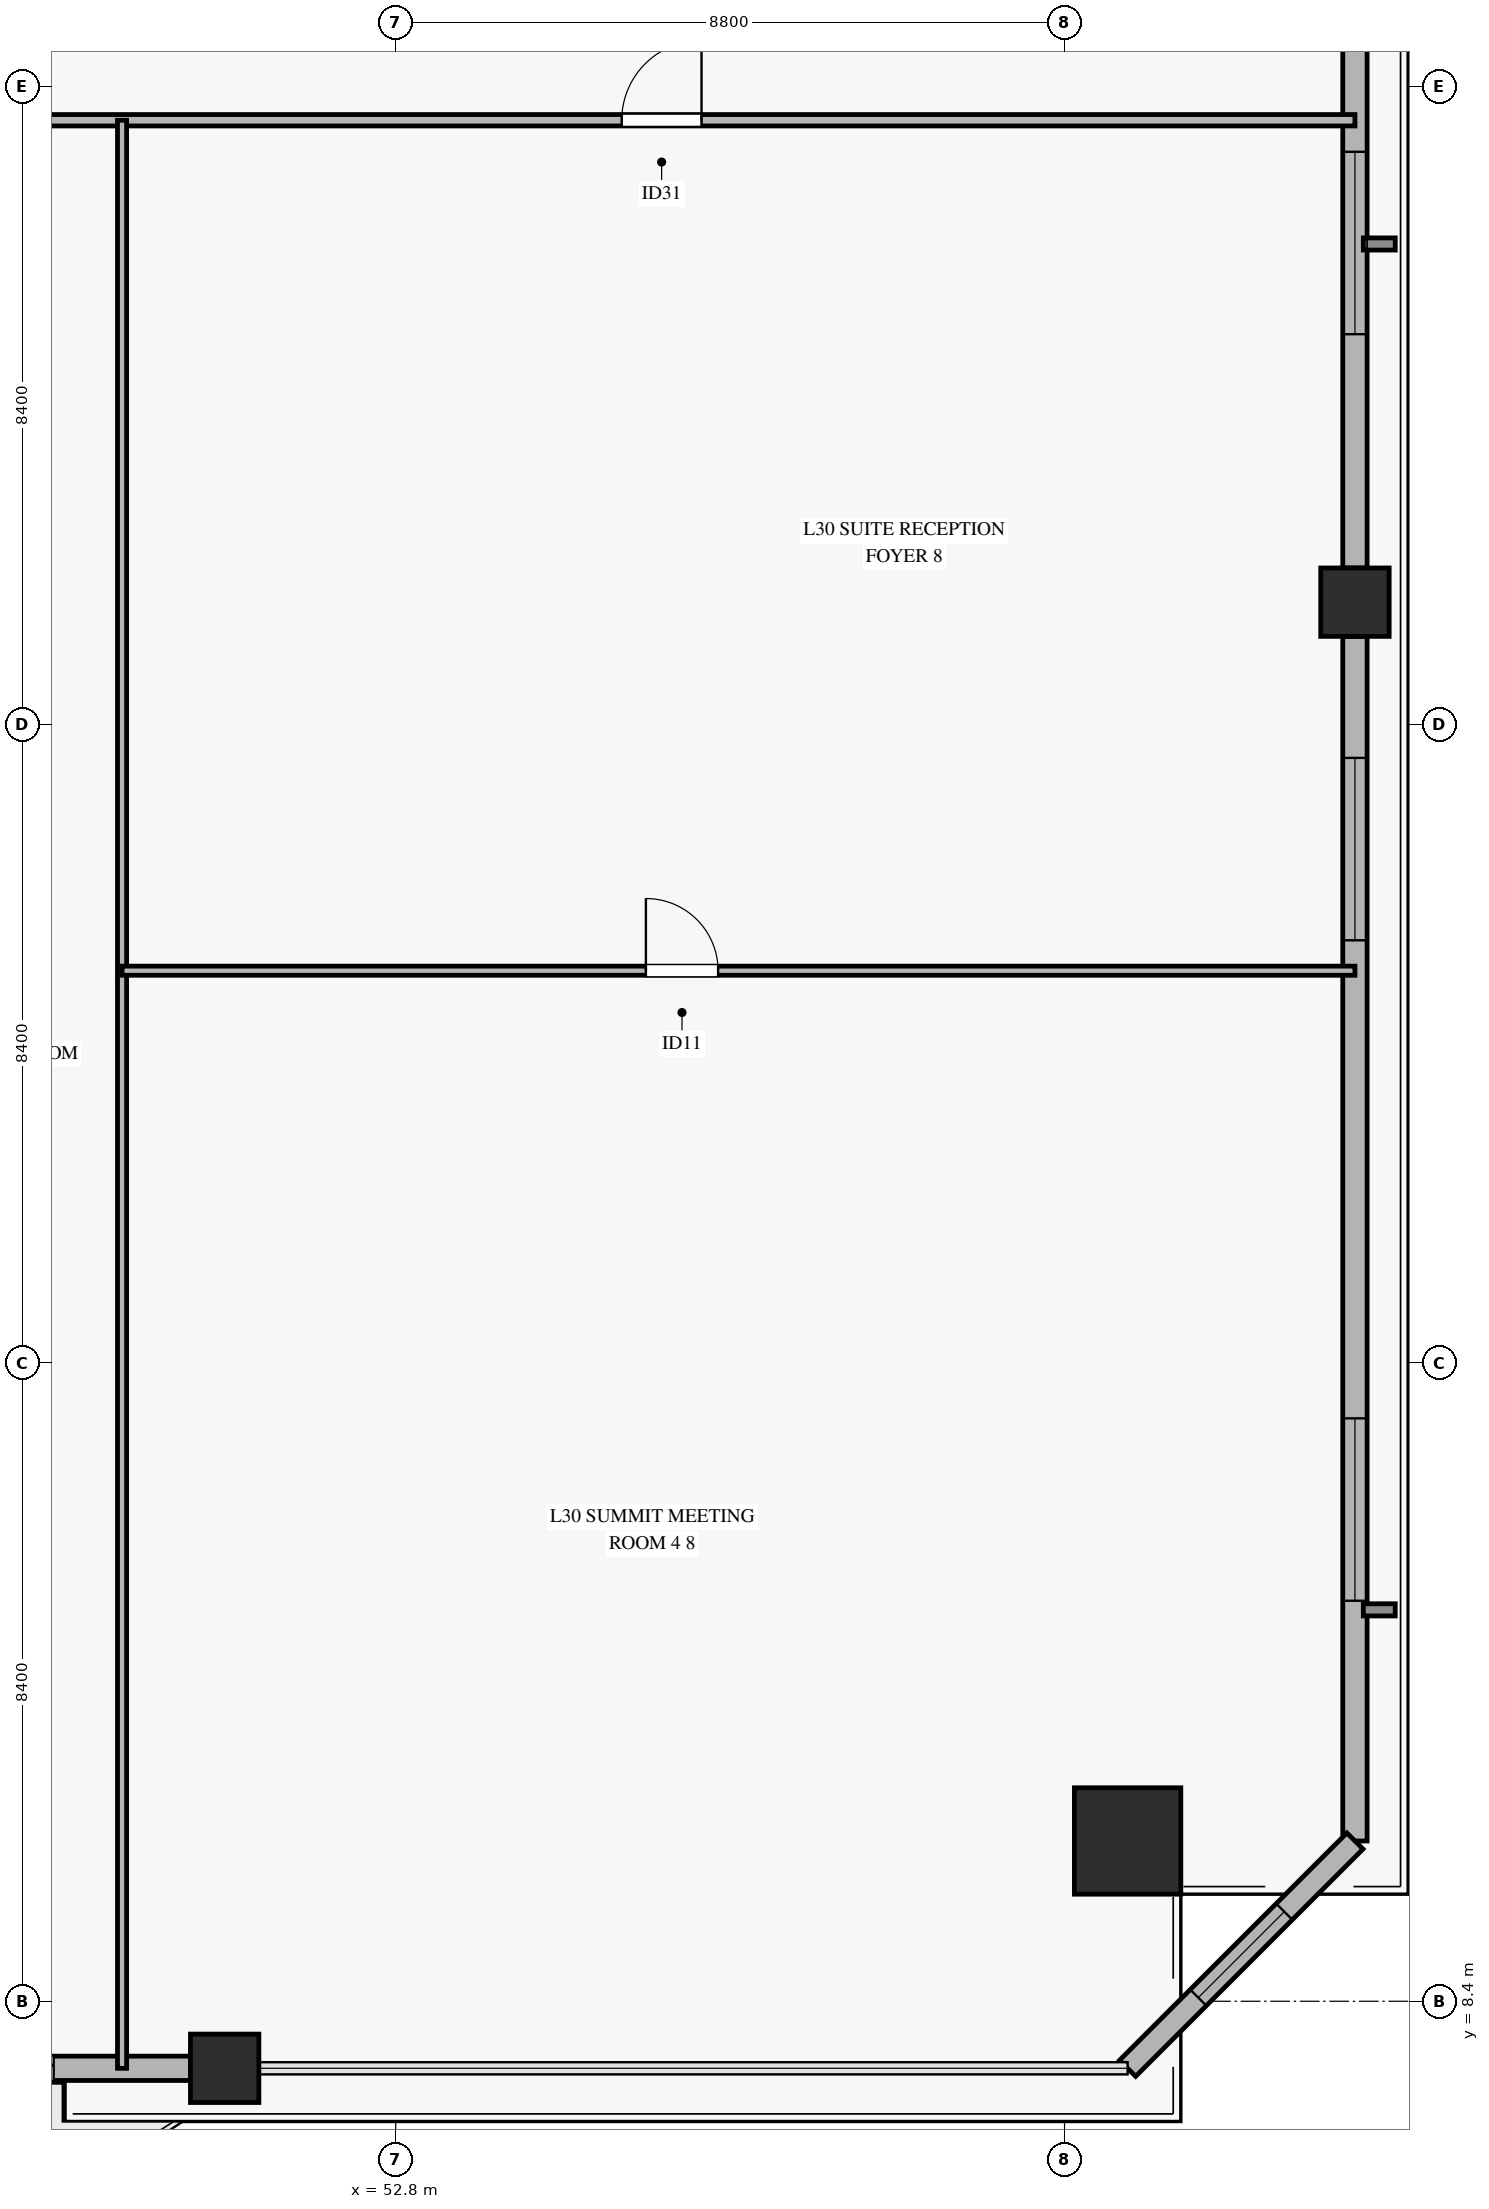
"""IFC4 building model, lengths in metres.
Left out: names, types, materials, properties, quantities, classifications, styles, units other than length and angle.
Written with IfcOpenShell. Run it as: python <this file> out.ifc"""

import sys

from ifc_helpers import new_model, si_unit, direction, frame, frame_2d, origin, origin_2d, place, context, subcontext, project, spatial, rectangle, hollow_rectangle, extrude, source, transform, mapped, element, fill, save


model = new_model("IFC4")
c1 = context("Model", 3, precision=1e-05, world=origin(), true_north=direction((0.0, 1.0)))
c2 = subcontext(c1, "Body", "Model", "MODEL_VIEW")
j1 = project(units=[si_unit("LENGTHUNIT", "METRE"), si_unit("PLANEANGLEUNIT", "RADIAN")], contexts=[c1])
p1 = place(None, origin())
s1 = spatial("IfcSite", under=j1, at=p1, CompositionType="ELEMENT")
p2 = place(p1, origin())
s2 = spatial("IfcBuilding", under=s1, at=p2, CompositionType="ELEMENT")
p3 = place(p2, frame((0.0, 0.0, 123.1)))
s3 = spatial("IfcBuildingStorey", under=s2, at=p3, CompositionType="ELEMENT", Elevation=123.1)
m1 = source(origin(), c2, "Body", "SweptSolid", [
    extrude(hollow_rectangle(XDim=1.4, YDim=1.4, WallThickness=0.065, at=origin_2d()), origin(), (0.0, 0.0, 1.0), 3.68),
])
p4 = place(p3, frame((62.43, 10.509, 0.0), z_axis=(0.0, 0.0, 1.0), x_axis=(1.0, 0.0, 0.0)))
e1 = element("IfcColumn", 1, at=p4, inside=s3, PredefinedType="COLUMN", context=c2, shape_type="MappedRepresentation", body=[
    mapped(m1, transform((0.0, 0.0, 0.0), x_axis=(1.0, 0.0, 0.0), y_axis=(0.0, 1.0, 0.0), z_axis=(0.0, 0.0, 1.0), scale=1.0)),
])
m2 = source(origin(), c2, "Body", "SweptSolid", [
    extrude(hollow_rectangle(XDim=0.9, YDim=0.9, WallThickness=0.04, at=origin_2d()), origin(), (0.0, 0.0, 1.0), 3.68),
])
for number, where, z_axis, x_axis in (
    (2, (50.55, 7.518, 0.0), (0.0, 0.0, 1.0), (1.0, 0.0, 0.0)),
    (3, (65.421, 26.809, 0.0), (0.0, 0.0, 1.0), (1.0, 0.0, 0.0)),
):
    element("IfcColumn", number, at=place(p3, frame(where, z_axis=z_axis, x_axis=x_axis)), inside=s3, PredefinedType="COLUMN", context=c2, shape_type="MappedRepresentation", body=[
        mapped(m2, transform((0.0, 0.0, 0.0), x_axis=(1.0, 0.0, 0.0), y_axis=(0.0, 1.0, 0.0), z_axis=(0.0, 0.0, 1.0), scale=1.0)),
    ])
p5 = place(p3, frame((44.75, 7.518, 0.0), z_axis=(0.0, 0.0, 1.0), x_axis=(1.0, 0.0, 0.0)))
e4 = element("IfcWall", 4, at=p5, inside=s3, PredefinedType="SOLIDWALL", context=c2, shape_type="SweptSolid", body=[
    extrude(rectangle(XDim=5.35, YDim=0.32, at=frame_2d((2.675, 0.0))), origin(), (0.0, 0.0, 1.0), 3.16),
])
p6 = place(p5, frame((1.75, 0.0, 0.0)))
e5 = element("IfcOpeningElement", 5, at=p6, cuts=e4, PredefinedType="OPENING", context=c2, shape_type="SweptSolid", body=[
    extrude(rectangle(XDim=1.8, YDim=2.25, at=frame_2d((0.9, 1.125))), frame((0.0, 0.17, 0.0), z_axis=(0.0, -1.0, 0.0), x_axis=(1.0, 0.0, 0.0)), (0.0, 0.0, 1.0), 0.34),
])
p7 = place(p3, frame((65.421, 10.509, 0.0), z_axis=(0.0, 0.0, 1.0), x_axis=(0.0, 1.0, 0.0)))
e6 = element("IfcWall", 6, at=p7, inside=s3, PredefinedType="SOLIDWALL", context=c2, shape_type="SweptSolid", body=[
    extrude(rectangle(XDim=15.85, YDim=0.32, at=frame_2d((7.925, 0.0))), origin(), (0.0, 0.0, 1.0), 3.16),
])
p8 = place(p7, frame((3.161, 0.0, 0.45)))
e7 = element("IfcOpeningElement", 7, at=p8, cuts=e6, PredefinedType="OPENING", context=c2, shape_type="SweptSolid", body=[
    extrude(rectangle(XDim=2.4, YDim=2.1, at=frame_2d((1.2, 1.05))), frame((0.0, 0.17, 0.0), z_axis=(0.0, -1.0, 0.0), x_axis=(1.0, 0.0, 0.0)), (0.0, 0.0, 1.0), 0.34),
])
p9 = place(p7, frame((11.851, 0.0, 0.45)))
e8 = element("IfcOpeningElement", 8, at=p9, cuts=e6, PredefinedType="OPENING", context=c2, shape_type="SweptSolid", body=[
    extrude(rectangle(XDim=2.4, YDim=2.1, at=frame_2d((1.2, 1.05))), frame((0.0, 0.17, 0.0), z_axis=(0.0, -1.0, 0.0), x_axis=(1.0, 0.0, 0.0)), (0.0, 0.0, 1.0), 0.34),
])
p10 = place(p3, frame((65.421, 27.259, 0.0), z_axis=(0.0, 0.0, 1.0), x_axis=(0.0, 1.0, 0.0)))
e9 = element("IfcWall", 9, at=p10, inside=s3, PredefinedType="SOLIDWALL", context=c2, shape_type="SweptSolid", body=[
    extrude(rectangle(XDim=15.85, YDim=0.32, at=frame_2d((7.925, 0.0))), origin(), (0.0, 0.0, 1.0), 3.16),
])
p11 = place(p10, frame((3.076, 0.0, 0.45)))
e10 = element("IfcOpeningElement", 10, at=p11, cuts=e9, PredefinedType="OPENING", context=c2, shape_type="SweptSolid", body=[
    extrude(rectangle(XDim=2.4, YDim=2.1, at=frame_2d((1.2, 1.05))), frame((0.0, 0.17, 0.0), z_axis=(0.0, -1.0, 0.0), x_axis=(1.0, 0.0, 0.0)), (0.0, 0.0, 1.0), 0.34),
])
p12 = place(p3, frame((62.43, 7.518, 0.0), z_axis=(0.0, 0.0, 1.0), x_axis=(0.707106781187, 0.707106781187, 0.0)))
e11 = element("IfcWall", 11, at=p12, inside=s3, PredefinedType="SOLIDWALL", context=c2, shape_type="SweptSolid", body=[
    extrude(rectangle(XDim=4.23, YDim=0.3, at=frame_2d((2.115, 0.0))), origin(), (0.0, 0.0, 1.0), 3.16),
])
p13 = place(p12, frame((1.315, 0.0, 0.45)))
e12 = element("IfcOpeningElement", 12, at=p13, cuts=e11, PredefinedType="OPENING", context=c2, shape_type="SweptSolid", body=[
    extrude(rectangle(XDim=1.6, YDim=2.0, at=frame_2d((0.8, 1.0))), frame((0.0, 0.16, 0.0), z_axis=(0.0, -1.0, 0.0), x_axis=(1.0, 0.0, 0.0)), (0.0, 0.0, 1.0), 0.32),
])
p14 = place(p3, frame((4.979, 33.15, 0.0), z_axis=(0.0, 0.0, 1.0), x_axis=(1.0, 0.0, 0.0)))
e13 = element("IfcWall", 13, at=p14, inside=s3, PredefinedType="PARTITIONING", context=c2, shape_type="SweptSolid", body=[
    extrude(rectangle(XDim=60.442, YDim=0.15, at=frame_2d((30.221, 0.0))), origin(), (0.0, 0.0, 1.0), 2.765),
])
p15 = place(p14, frame((6.774, 0.0, 0.0)))
e14 = element("IfcOpeningElement", 14, at=p15, cuts=e13, PredefinedType="OPENING", context=c2, shape_type="SweptSolid", body=[
    extrude(rectangle(XDim=1.05, YDim=2.15, at=frame_2d((0.525, 1.075))), frame((0.0, 0.085, 0.0), z_axis=(0.0, -1.0, 0.0), x_axis=(1.0, 0.0, 0.0)), (0.0, 0.0, 1.0), 0.17),
])
p16 = place(p14, frame((17.131, 0.0, 0.0)))
e15 = element("IfcOpeningElement", 15, at=p16, cuts=e13, PredefinedType="OPENING", context=c2, shape_type="SweptSolid", body=[
    extrude(rectangle(XDim=1.05, YDim=2.15, at=frame_2d((0.525, 1.075))), frame((0.0, 0.085, 0.0), z_axis=(0.0, -1.0, 0.0), x_axis=(1.0, 0.0, 0.0)), (0.0, 0.0, 1.0), 0.17),
])
p17 = place(p14, frame((21.191, 0.0, 0.0)))
e16 = element("IfcOpeningElement", 16, at=p17, cuts=e13, PredefinedType="OPENING", context=c2, shape_type="SweptSolid", body=[
    extrude(rectangle(XDim=1.05, YDim=2.15, at=frame_2d((0.525, 1.075))), frame((0.0, 0.085, 0.0), z_axis=(0.0, -1.0, 0.0), x_axis=(1.0, 0.0, 0.0)), (0.0, 0.0, 1.0), 0.17),
])
p18 = place(p14, frame((26.768, 0.0, 0.0)))
e17 = element("IfcOpeningElement", 17, at=p18, cuts=e13, PredefinedType="OPENING", context=c2, shape_type="SweptSolid", body=[
    extrude(rectangle(XDim=1.05, YDim=2.15, at=frame_2d((0.525, 1.075))), frame((0.0, 0.085, 0.0), z_axis=(0.0, -1.0, 0.0), x_axis=(1.0, 0.0, 0.0)), (0.0, 0.0, 1.0), 0.17),
])
p19 = place(p14, frame((31.968, 0.0, 0.0)))
e18 = element("IfcOpeningElement", 18, at=p19, cuts=e13, PredefinedType="OPENING", context=c2, shape_type="SweptSolid", body=[
    extrude(rectangle(XDim=1.05, YDim=2.15, at=frame_2d((0.525, 1.075))), frame((0.0, 0.085, 0.0), z_axis=(0.0, -1.0, 0.0), x_axis=(1.0, 0.0, 0.0)), (0.0, 0.0, 1.0), 0.17),
])
p20 = place(p14, frame((37.084, 0.0, 0.0)))
e19 = element("IfcOpeningElement", 19, at=p20, cuts=e13, PredefinedType="OPENING", context=c2, shape_type="SweptSolid", body=[
    extrude(rectangle(XDim=1.05, YDim=2.15, at=frame_2d((0.525, 1.075))), frame((0.0, 0.085, 0.0), z_axis=(0.0, -1.0, 0.0), x_axis=(1.0, 0.0, 0.0)), (0.0, 0.0, 1.0), 0.17),
])
p21 = place(p14, frame((41.832, 0.0, 0.0)))
e20 = element("IfcOpeningElement", 20, at=p21, cuts=e13, PredefinedType="OPENING", context=c2, shape_type="SweptSolid", body=[
    extrude(rectangle(XDim=1.05, YDim=2.15, at=frame_2d((0.525, 1.075))), frame((0.0, 0.085, 0.0), z_axis=(0.0, -1.0, 0.0), x_axis=(1.0, 0.0, 0.0)), (0.0, 0.0, 1.0), 0.17),
])
p22 = place(p14, frame((50.795, 0.0, 0.0)))
e21 = element("IfcOpeningElement", 21, at=p22, cuts=e13, PredefinedType="OPENING", context=c2, shape_type="SweptSolid", body=[
    extrude(rectangle(XDim=1.05, YDim=2.15, at=frame_2d((0.525, 1.075))), frame((0.0, 0.085, 0.0), z_axis=(0.0, -1.0, 0.0), x_axis=(1.0, 0.0, 0.0)), (0.0, 0.0, 1.0), 0.17),
])
p23 = place(p3, frame((49.2, 7.518, 0.0), z_axis=(0.0, 0.0, 1.0), x_axis=(0.0, 1.0, 0.0)))
e22 = element("IfcWall", 22, at=p23, inside=s3, PredefinedType="PARTITIONING", context=c2, shape_type="SweptSolid", body=[
    extrude(rectangle(XDim=25.632, YDim=0.12, at=frame_2d((12.816, 0.0))), origin(), (0.0, 0.0, 1.0), 3.165),
])
p24 = place(p3, frame((49.2, 21.96, 0.0), z_axis=(0.0, 0.0, 1.0), x_axis=(1.0, 0.0, 0.0)))
e23 = element("IfcWall", 23, at=p24, inside=s3, PredefinedType="PARTITIONING", context=c2, shape_type="SweptSolid", body=[
    extrude(rectangle(XDim=16.221, YDim=0.12, at=frame_2d((8.11, 0.0))), origin(), (0.0, 0.0, 1.0), 2.765),
])
p25 = place(p24, frame((6.892, 0.0, 0.0)))
e24 = element("IfcOpeningElement", 24, at=p25, cuts=e23, PredefinedType="OPENING", context=c2, shape_type="SweptSolid", body=[
    extrude(rectangle(XDim=0.95, YDim=2.1, at=frame_2d((0.475, 1.05))), frame((0.0, 0.07, 0.0), z_axis=(0.0, -1.0, 0.0), x_axis=(1.0, 0.0, 0.0)), (0.0, 0.0, 1.0), 0.14),
])
m3 = source(origin(), c2, "Body", "SweptSolid", [
    extrude(rectangle(XDim=1.8, YDim=2.25, at=frame_2d((0.9, 1.125))), frame((0.0, 0.025, 0.0), z_axis=(0.0, -1.0, 0.0), x_axis=(1.0, 0.0, 0.0)), (0.0, 0.0, 1.0), 0.05),
])
p26 = place(p6, origin())
e25 = element("IfcDoor", 25, at=p26, inside=s3, OperationType="SLIDING_TO_LEFT", PredefinedType="DOOR", context=c2, shape_type="MappedRepresentation", body=[
    mapped(m3, transform((0.0, 0.0, 0.0), x_axis=(1.0, 0.0, 0.0), y_axis=(0.0, 1.0, 0.0), z_axis=(0.0, 0.0, 1.0), scale=1.0)),
])
fill(e5, e25)
m4 = source(origin(), c2, "Body", "SweptSolid", [
    extrude(rectangle(XDim=2.4, YDim=2.1, at=frame_2d((1.2, 1.05))), frame((0.0, 0.03, 0.0), z_axis=(0.0, -1.0, 0.0), x_axis=(1.0, 0.0, 0.0)), (0.0, 0.0, 1.0), 0.06),
])
p27 = place(p8, origin())
e26 = element("IfcWindow", 26, at=p27, inside=s3, PartitioningType="SINGLE_PANEL", PredefinedType="WINDOW", context=c2, shape_type="MappedRepresentation", body=[
    mapped(m4, transform((0.0, 0.0, 0.0), x_axis=(1.0, 0.0, 0.0), y_axis=(0.0, 1.0, 0.0), z_axis=(0.0, 0.0, 1.0), scale=1.0)),
])
fill(e7, e26)
p28 = place(p9, origin())
e27 = element("IfcWindow", 27, at=p28, inside=s3, PartitioningType="SINGLE_PANEL", PredefinedType="WINDOW", context=c2, shape_type="MappedRepresentation", body=[
    mapped(m4, transform((0.0, 0.0, 0.0), x_axis=(1.0, 0.0, 0.0), y_axis=(0.0, 1.0, 0.0), z_axis=(0.0, 0.0, 1.0), scale=1.0)),
])
fill(e8, e27)
p29 = place(p11, origin())
e28 = element("IfcWindow", 28, at=p29, inside=s3, PartitioningType="SINGLE_PANEL", PredefinedType="WINDOW", context=c2, shape_type="MappedRepresentation", body=[
    mapped(m4, transform((0.0, 0.0, 0.0), x_axis=(1.0, 0.0, 0.0), y_axis=(0.0, 1.0, 0.0), z_axis=(0.0, 0.0, 1.0), scale=1.0)),
])
fill(e10, e28)
m5 = source(origin(), c2, "Body", "SweptSolid", [
    extrude(rectangle(XDim=1.6, YDim=2.0, at=frame_2d((0.8, 1.0))), frame((0.0, 0.03, 0.0), z_axis=(0.0, -1.0, 0.0), x_axis=(1.0, 0.0, 0.0)), (0.0, 0.0, 1.0), 0.06),
])
p30 = place(p13, origin())
e29 = element("IfcWindow", 29, at=p30, inside=s3, PartitioningType="SINGLE_PANEL", PredefinedType="WINDOW", context=c2, shape_type="MappedRepresentation", body=[
    mapped(m5, transform((0.0, 0.0, 0.0), x_axis=(1.0, 0.0, 0.0), y_axis=(0.0, 1.0, 0.0), z_axis=(0.0, 0.0, 1.0), scale=1.0)),
])
fill(e12, e29)
m6 = source(origin(), c2, "Body", "SweptSolid", [
    extrude(rectangle(XDim=1.05, YDim=2.15, at=frame_2d((0.525, 1.075))), frame((0.0, 0.025, 0.0), z_axis=(0.0, -1.0, 0.0), x_axis=(1.0, 0.0, 0.0)), (0.0, 0.0, 1.0), 0.05),
])
p31 = place(p22, origin())
e30 = element("IfcDoor", 30, at=p31, inside=s3, OperationType="SINGLE_SWING_RIGHT", PredefinedType="DOOR", context=c2, shape_type="MappedRepresentation", body=[
    mapped(m6, transform((0.0, 0.0, 0.0), x_axis=(1.0, 0.0, 0.0), y_axis=(0.0, 1.0, 0.0), z_axis=(0.0, 0.0, 1.0), scale=1.0)),
])
fill(e21, e30)
m7 = source(origin(), c2, "Body", "SweptSolid", [
    extrude(rectangle(XDim=0.95, YDim=2.1, at=frame_2d((0.475, 1.05))), frame((0.0, 0.025, 0.0), z_axis=(0.0, -1.0, 0.0), x_axis=(1.0, 0.0, 0.0)), (0.0, 0.0, 1.0), 0.05),
])
p32 = place(p25, origin())
e31 = element("IfcDoor", 31, at=p32, inside=s3, OperationType="SINGLE_SWING_LEFT", PredefinedType="DOOR", context=c2, shape_type="MappedRepresentation", body=[
    mapped(m7, transform((0.0, 0.0, 0.0), x_axis=(1.0, 0.0, 0.0), y_axis=(0.0, 1.0, 0.0), z_axis=(0.0, 0.0, 1.0), scale=1.0)),
])
fill(e24, e31)
save(model, sys.argv[1])
